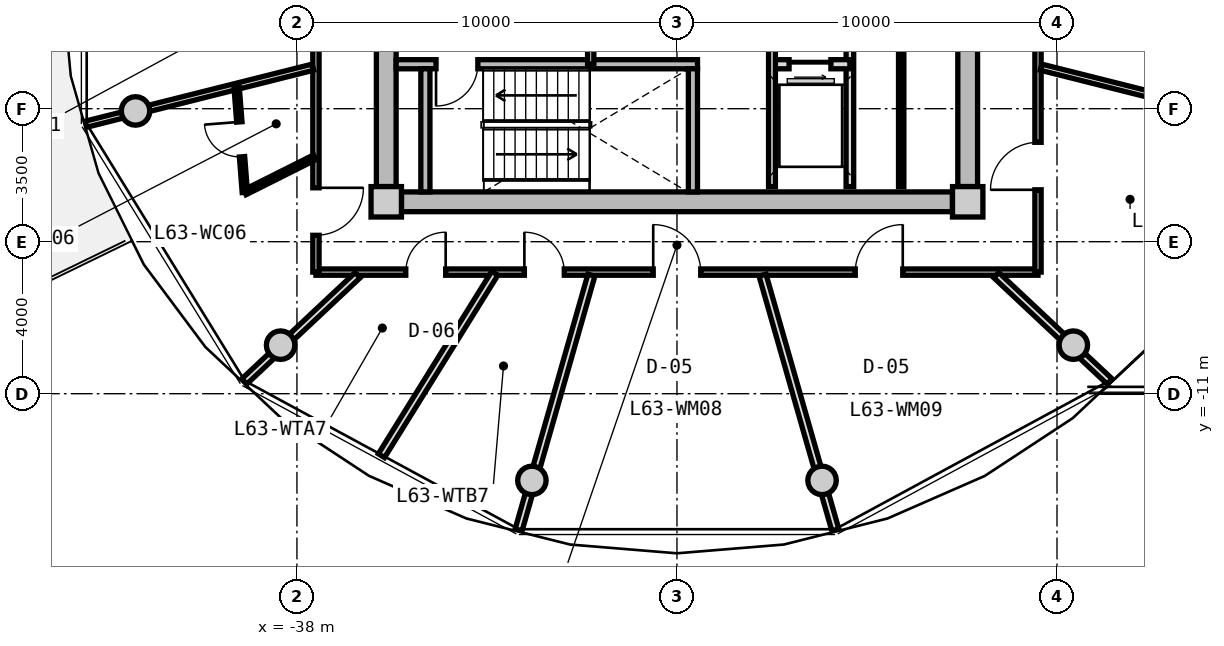
"""IFC4 building model, lengths in metres.
Left out: names, types, materials, properties, quantities, classifications, styles, units other than length and angle.
Written with IfcOpenShell. Run it as: python <this file> out.ifc"""

import sys

from ifc_helpers import new_model, si_unit, direction, frame, frame_2d, origin, origin_2d, place, context, subcontext, project, spatial, rectangle, circle, extrude, source, transform, mapped, element, fill, save


model = new_model("IFC4")
c1 = context("Model", 3, precision=1e-05, world=origin(), true_north=direction((0.0, 1.0)))
c2 = subcontext(c1, "Body", "Model", "MODEL_VIEW")
j1 = project(units=[si_unit("LENGTHUNIT", "METRE"), si_unit("PLANEANGLEUNIT", "RADIAN")], contexts=[c1])
p1 = place(None, origin())
s1 = spatial("IfcSite", under=j1, at=p1, CompositionType="ELEMENT")
p2 = place(p1, origin())
s2 = spatial("IfcBuilding", under=s1, at=p2, CompositionType="ELEMENT")
p3 = place(p2, frame((0.0, 0.0, 203.8)))
s3 = spatial("IfcBuildingStorey", under=s2, at=p3, CompositionType="ELEMENT", Elevation=203.8)
m1 = source(origin(), c2, "Body", "SweptSolid", [
    extrude(rectangle(XDim=0.8, YDim=0.8, at=origin_2d()), origin(), (0.0, 0.0, 1.0), 4.0),
])
for number, where, z_axis, x_axis in (
    (1, (-35.65, -5.95, 0.0), (0.0, 0.0, 1.0), (1.0, 0.0, 0.0)),
    (2, (-20.35, -5.95, 0.0), (0.0, 0.0, 1.0), (1.0, 0.0, 0.0)),
):
    element("IfcColumn", number, at=place(p3, frame(where, z_axis=z_axis, x_axis=x_axis)), inside=s3, PredefinedType="COLUMN", context=c2, shape_type="MappedRepresentation", body=[
        mapped(m1, transform((0.0, 0.0, 0.0), x_axis=(1.0, 0.0, 0.0), y_axis=(0.0, 1.0, 0.0), z_axis=(0.0, 0.0, 1.0), scale=1.0)),
    ])
m2 = source(origin(), c2, "Body", "SweptSolid", [
    extrude(rectangle(XDim=14.5, YDim=0.52, at=frame_2d((7.25, 0.0))), origin(), (0.0, 0.0, 1.0), 3.71),
])
p4 = place(p3, frame((-20.75, -5.95, 0.0), z_axis=(0.0, 0.0, 1.0), x_axis=(-1.0, 0.0, 0.0)))
e3 = element("IfcWall", 3, at=p4, inside=s3, PredefinedType="SHEAR", context=c2, shape_type="MappedRepresentation", body=[
    mapped(m2, transform((0.0, 0.0, 0.0), x_axis=(1.0, 0.0, 0.0), y_axis=(0.0, 1.0, 0.0), z_axis=(0.0, 0.0, 1.0), scale=1.0)),
])
m3 = source(origin(), c2, "Body", "SweptSolid", [
    extrude(rectangle(XDim=11.1, YDim=0.52, at=frame_2d((5.55, 0.0))), origin(), (0.0, 0.0, 1.0), 3.71),
])
p5 = place(p3, frame((-35.65, -5.55, 0.0), z_axis=(0.0, 0.0, 1.0), x_axis=(0.0, 1.0, 0.0)))
e4 = element("IfcWall", 4, at=p5, inside=s3, PredefinedType="SHEAR", context=c2, shape_type="MappedRepresentation", body=[
    mapped(m3, transform((0.0, 0.0, 0.0), x_axis=(1.0, 0.0, 0.0), y_axis=(0.0, 1.0, 0.0), z_axis=(0.0, 0.0, 1.0), scale=1.0)),
])
p6 = place(p5, frame((3.8, 0.0, 0.0)))
e5 = element("IfcOpeningElement", 5, at=p6, cuts=e4, PredefinedType="OPENING", context=c2, shape_type="SweptSolid", body=[
    extrude(rectangle(XDim=1.2, YDim=2.15, at=frame_2d((0.6, 1.075))), frame((0.0, 0.27, 0.0), z_axis=(0.0, -1.0, 0.0), x_axis=(1.0, 0.0, 0.0)), (0.0, 0.0, 1.0), 0.54),
])
p7 = place(p3, frame((-20.35, 5.55, 0.0), z_axis=(0.0, 0.0, 1.0), x_axis=(0.0, -1.0, 0.0)))
e6 = element("IfcWall", 6, at=p7, inside=s3, PredefinedType="SHEAR", context=c2, shape_type="MappedRepresentation", body=[
    mapped(m3, transform((0.0, 0.0, 0.0), x_axis=(1.0, 0.0, 0.0), y_axis=(0.0, 1.0, 0.0), z_axis=(0.0, 0.0, 1.0), scale=1.0)),
])
p8 = place(p7, frame((5.65, 0.0, 0.0)))
e7 = element("IfcOpeningElement", 7, at=p8, cuts=e6, PredefinedType="OPENING", context=c2, shape_type="SweptSolid", body=[
    extrude(rectangle(XDim=1.2, YDim=2.15, at=frame_2d((0.6, 1.075))), frame((0.0, 0.27, 0.0), z_axis=(0.0, -1.0, 0.0), x_axis=(1.0, 0.0, 0.0)), (0.0, 0.0, 1.0), 0.54),
])
m4 = source(origin(), c2, "Body", "SweptSolid", [
    extrude(circle(Radius=0.375, at=origin_2d()), origin(), (0.0, 0.0, 1.0), 4.0),
])
for number, where, z_axis, x_axis in (
    (8, (-42.247, -3.559, 0.0), (0.0, 0.0, 1.0), (1.0, 0.0, 0.0)),
    (9, (-38.43, -9.723, 0.0), (0.0, 0.0, 1.0), (1.0, 0.0, 0.0)),
    (10, (-31.818, -13.281, 0.0), (0.0, 0.0, 1.0), (1.0, 0.0, 0.0)),
    (11, (-24.182, -13.281, 0.0), (0.0, 0.0, 1.0), (1.0, 0.0, 0.0)),
    (12, (-17.57, -9.723, 0.0), (0.0, 0.0, 1.0), (1.0, 0.0, 0.0)),
):
    element("IfcColumn", number, at=place(p3, frame(where, z_axis=z_axis, x_axis=x_axis)), inside=s3, PredefinedType="COLUMN", context=c2, shape_type="MappedRepresentation", body=[
        mapped(m4, transform((0.0, 0.0, 0.0), x_axis=(1.0, 0.0, 0.0), y_axis=(0.0, 1.0, 0.0), z_axis=(0.0, 0.0, 1.0), scale=1.0)),
    ])
m5 = source(origin(), c2, "Body", "SweptSolid", [
    extrude(rectangle(XDim=7.93, YDim=0.24, at=frame_2d((3.965, 0.0))), origin(), (0.0, 0.0, 1.0), 3.71),
])
p9 = place(p3, frame((-35.39, -2.33, 0.0), z_axis=(0.0, 0.0, 1.0), x_axis=(1.0, 0.0, 0.0)))
e13 = element("IfcWall", 13, at=p9, inside=s3, PredefinedType="PARTITIONING", context=c2, shape_type="MappedRepresentation", body=[
    mapped(m5, transform((0.0, 0.0, 0.0), x_axis=(1.0, 0.0, 0.0), y_axis=(0.0, 1.0, 0.0), z_axis=(0.0, 0.0, 1.0), scale=1.0)),
])
p10 = place(p9, frame((1.05, 0.0, 0.0)))
e14 = element("IfcOpeningElement", 14, at=p10, cuts=e13, PredefinedType="OPENING", context=c2, shape_type="SweptSolid", body=[
    extrude(rectangle(XDim=1.1, YDim=2.15, at=frame_2d((0.55, 1.075))), frame((0.0, 0.13, 0.0), z_axis=(0.0, -1.0, 0.0), x_axis=(1.0, 0.0, 0.0)), (0.0, 0.0, 1.0), 0.26),
])
m6 = source(origin(), c2, "Body", "SweptSolid", [
    extrude(rectangle(XDim=3.24, YDim=0.24, at=frame_2d((1.62, 0.0))), origin(), (0.0, 0.0, 1.0), 3.71),
])
for number, where, z_axis, x_axis in (
    (15, (-34.62, -5.69, 0.0), (0.0, 0.0, 1.0), (0.0, 1.0, 0.0)),
    (16, (-27.58, -5.69, 0.0), (0.0, 0.0, 1.0), (0.0, 1.0, 0.0)),
):
    element("IfcWall", number, at=place(p3, frame(where, z_axis=z_axis, x_axis=x_axis)), inside=s3, PredefinedType="PARTITIONING", context=c2, shape_type="MappedRepresentation", body=[
        mapped(m6, transform((0.0, 0.0, 0.0), x_axis=(1.0, 0.0, 0.0), y_axis=(0.0, 1.0, 0.0), z_axis=(0.0, 0.0, 1.0), scale=1.0)),
    ])
m7 = source(origin(), c2, "Body", "SweptSolid", [
    extrude(rectangle(XDim=3.8, YDim=0.2, at=frame_2d((1.9, 0.0))), origin(), (0.0, 0.0, 1.0), 3.695),
])
p11 = place(p3, frame((-23.45, -5.55, 0.0), z_axis=(0.0, 0.0, 1.0), x_axis=(0.0, 1.0, 0.0)))
e17 = element("IfcWall", 17, at=p11, inside=s3, PredefinedType="PARTITIONING", context=c2, shape_type="MappedRepresentation", body=[
    mapped(m7, transform((0.0, 0.0, 0.0), x_axis=(1.0, 0.0, 0.0), y_axis=(0.0, 1.0, 0.0), z_axis=(0.0, 0.0, 1.0), scale=1.0)),
])
m8 = source(origin(), c2, "Body", "SweptSolid", [
    extrude(rectangle(XDim=2.05, YDim=0.24, at=frame_2d((1.025, 0.0))), origin(), (0.0, 0.0, 1.0), 3.695),
])
p12 = place(p3, frame((-25.5, -2.33, 0.0), z_axis=(0.0, 0.0, 1.0), x_axis=(1.0, 0.0, 0.0)))
e18 = element("IfcWall", 18, at=p12, inside=s3, PredefinedType="PARTITIONING", context=c2, shape_type="MappedRepresentation", body=[
    mapped(m8, transform((0.0, 0.0, 0.0), x_axis=(1.0, 0.0, 0.0), y_axis=(0.0, 1.0, 0.0), z_axis=(0.0, 0.0, 1.0), scale=1.0)),
])
p13 = place(p12, frame((0.45, 0.0, 0.0)))
e19 = element("IfcOpeningElement", 19, at=p13, cuts=e18, PredefinedType="OPENING", context=c2, shape_type="SweptSolid", body=[
    extrude(rectangle(XDim=1.1, YDim=2.2, at=frame_2d((0.55, 1.1))), frame((0.0, 0.13, 0.0), z_axis=(0.0, -1.0, 0.0), x_axis=(1.0, 0.0, 0.0)), (0.0, 0.0, 1.0), 0.26),
])
m9 = source(origin(), c2, "Body", "SweptSolid", [
    extrude(rectangle(XDim=4.2, YDim=0.18, at=frame_2d((2.1, 0.0))), origin(), (0.0, 0.0, 1.0), 3.695),
])
p14 = place(p3, frame((-25.5, -5.55, 0.0), z_axis=(0.0, 0.0, 1.0), x_axis=(0.0, 1.0, 0.0)))
e20 = element("IfcWall", 20, at=p14, inside=s3, PredefinedType="PARTITIONING", context=c2, shape_type="MappedRepresentation", body=[
    mapped(m9, transform((0.0, 0.0, 0.0), x_axis=(1.0, 0.0, 0.0), y_axis=(0.0, 1.0, 0.0), z_axis=(0.0, 0.0, 1.0), scale=1.0)),
])
m10 = source(origin(), c2, "Body", "SweptSolid", [
    extrude(rectangle(XDim=0.98, YDim=0.165, at=frame_2d((0.49, 0.0))), origin(), (0.0, 0.0, 1.0), 3.695),
])
p15 = place(p3, frame((-30.27, -2.33, 0.0), z_axis=(0.0, 0.0, 1.0), x_axis=(0.0, 1.0, 0.0)))
e21 = element("IfcWall", 21, at=p15, inside=s3, PredefinedType="PARTITIONING", context=c2, shape_type="MappedRepresentation", body=[
    mapped(m10, transform((0.0, 0.0, 0.0), x_axis=(1.0, 0.0, 0.0), y_axis=(0.0, 1.0, 0.0), z_axis=(0.0, 0.0, 1.0), scale=1.0)),
])
m11 = source(origin(), c2, "Body", "SweptSolid", [
    extrude(rectangle(XDim=3.8, YDim=0.14, at=frame_2d((1.9, 0.0))), origin(), (0.0, 0.0, 1.0), 3.695),
])
p16 = place(p3, frame((-22.1, -5.55, 0.0), z_axis=(0.0, 0.0, 1.0), x_axis=(0.0, 1.0, 0.0)))
e22 = element("IfcWall", 22, at=p16, inside=s3, PredefinedType="PARTITIONING", context=c2, shape_type="MappedRepresentation", body=[
    mapped(m11, transform((0.0, 0.0, 0.0), x_axis=(1.0, 0.0, 0.0), y_axis=(0.0, 1.0, 0.0), z_axis=(0.0, 0.0, 1.0), scale=1.0)),
])
m12 = source(origin(), c2, "Body", "SweptSolid", [
    extrude(rectangle(XDim=19.0, YDim=0.165, at=frame_2d((9.5, 0.0))), origin(), (0.0, 0.0, 1.0), 3.695),
])
p17 = place(p3, frame((-18.5, -7.8, 0.0), z_axis=(0.0, 0.0, 1.0), x_axis=(-1.0, 0.0, 0.0)))
e23 = element("IfcWall", 23, at=p17, inside=s3, PredefinedType="PARTITIONING", context=c2, shape_type="MappedRepresentation", body=[
    mapped(m12, transform((0.0, 0.0, 0.0), x_axis=(1.0, 0.0, 0.0), y_axis=(0.0, 1.0, 0.0), z_axis=(0.0, 0.0, 1.0), scale=1.0)),
])
p18 = place(p17, frame((15.586, 0.0, 0.0)))
e24 = element("IfcOpeningElement", 24, at=p18, cuts=e23, PredefinedType="OPENING", context=c2, shape_type="SweptSolid", body=[
    extrude(rectangle(XDim=1.05, YDim=2.15, at=frame_2d((0.525, 1.075))), frame((0.0, 0.093, 0.0), z_axis=(0.0, -1.0, 0.0), x_axis=(1.0, 0.0, 0.0)), (0.0, 0.0, 1.0), 0.185),
])
p19 = place(p17, frame((12.465, 0.0, 0.0)))
e25 = element("IfcOpeningElement", 25, at=p19, cuts=e23, PredefinedType="OPENING", context=c2, shape_type="SweptSolid", body=[
    extrude(rectangle(XDim=1.05, YDim=2.15, at=frame_2d((0.525, 1.075))), frame((0.0, 0.093, 0.0), z_axis=(0.0, -1.0, 0.0), x_axis=(1.0, 0.0, 0.0)), (0.0, 0.0, 1.0), 0.185),
])
p20 = place(p17, frame((8.875, 0.0, 0.0)))
e26 = element("IfcOpeningElement", 26, at=p20, cuts=e23, PredefinedType="OPENING", context=c2, shape_type="SweptSolid", body=[
    extrude(rectangle(XDim=1.25, YDim=2.2, at=frame_2d((0.625, 1.1))), frame((0.0, 0.093, 0.0), z_axis=(0.0, -1.0, 0.0), x_axis=(1.0, 0.0, 0.0)), (0.0, 0.0, 1.0), 0.185),
])
p21 = place(p17, frame((3.559, 0.0, 0.0)))
e27 = element("IfcOpeningElement", 27, at=p21, cuts=e23, PredefinedType="OPENING", context=c2, shape_type="SweptSolid", body=[
    extrude(rectangle(XDim=1.25, YDim=2.2, at=frame_2d((0.625, 1.1))), frame((0.0, 0.093, 0.0), z_axis=(0.0, -1.0, 0.0), x_axis=(1.0, 0.0, 0.0)), (0.0, 0.0, 1.0), 0.185),
])
m13 = source(origin(), c2, "Body", "SweptSolid", [
    extrude(rectangle(XDim=6.88, YDim=0.165, at=frame_2d((3.44, 0.0))), origin(), (0.0, 0.0, 1.0), 3.695),
])
p22 = place(p3, frame((-37.5, -7.8, 0.0), z_axis=(0.0, 0.0, 1.0), x_axis=(0.0, 1.0, 0.0)))
e28 = element("IfcWall", 28, at=p22, inside=s3, PredefinedType="PARTITIONING", context=c2, shape_type="MappedRepresentation", body=[
    mapped(m13, transform((0.0, 0.0, 0.0), x_axis=(1.0, 0.0, 0.0), y_axis=(0.0, 1.0, 0.0), z_axis=(0.0, 0.0, 1.0), scale=1.0)),
])
p23 = place(p22, frame((0.968, 0.0, 0.0)))
e29 = element("IfcOpeningElement", 29, at=p23, cuts=e28, PredefinedType="OPENING", context=c2, shape_type="SweptSolid", body=[
    extrude(rectangle(XDim=1.25, YDim=2.2, at=frame_2d((0.625, 1.1))), frame((0.0, 0.093, 0.0), z_axis=(0.0, -1.0, 0.0), x_axis=(1.0, 0.0, 0.0)), (0.0, 0.0, 1.0), 0.185),
])
p24 = place(p3, frame((-18.5, -0.92, 0.0), z_axis=(0.0, 0.0, 1.0), x_axis=(0.0, -1.0, 0.0)))
e30 = element("IfcWall", 30, at=p24, inside=s3, PredefinedType="PARTITIONING", context=c2, shape_type="MappedRepresentation", body=[
    mapped(m13, transform((0.0, 0.0, 0.0), x_axis=(1.0, 0.0, 0.0), y_axis=(0.0, 1.0, 0.0), z_axis=(0.0, 0.0, 1.0), scale=1.0)),
])
p25 = place(p24, frame((3.464, 0.0, 0.0)))
e31 = element("IfcOpeningElement", 31, at=p25, cuts=e30, PredefinedType="OPENING", context=c2, shape_type="SweptSolid", body=[
    extrude(rectangle(XDim=1.25, YDim=2.2, at=frame_2d((0.625, 1.1))), frame((0.0, 0.093, 0.0), z_axis=(0.0, -1.0, 0.0), x_axis=(1.0, 0.0, 0.0)), (0.0, 0.0, 1.0), 0.185),
])
m14 = source(origin(), c2, "Body", "SweptSolid", [
    extrude(rectangle(XDim=6.157, YDim=0.165, at=frame_2d((3.079, 0.0))), origin(), (0.0, 0.0, 1.0), 3.295),
])
for number, where, z_axis, x_axis in (
    (32, (-37.58, -2.407, 0.0), (0.0, 0.0, 1.0), (-0.97, -0.244, 0.0)),
    (33, (-18.42, -2.407, 0.0), (0.0, 0.0, 1.0), (0.97, -0.244, 0.0)),
):
    element("IfcWall", number, at=place(p3, frame(where, z_axis=z_axis, x_axis=x_axis)), inside=s3, PredefinedType="PARTITIONING", context=c2, shape_type="MappedRepresentation", body=[
        mapped(m14, transform((0.0, 0.0, 0.0), x_axis=(1.0, 0.0, 0.0), y_axis=(0.0, 1.0, 0.0), z_axis=(0.0, 0.0, 1.0), scale=1.0)),
    ])
m15 = source(origin(), c2, "Body", "SweptSolid", [
    extrude(rectangle(XDim=4.089, YDim=0.19, at=frame_2d((2.044, 0.0))), origin(), (0.0, 0.0, 1.0), 3.295),
])
p26 = place(p3, frame((-36.402, -7.88, 0.0), z_axis=(0.0, 0.0, 1.0), x_axis=(-0.729401273609, -0.684086092577, 0.0)))
e34 = element("IfcWall", 34, at=p26, inside=s3, PredefinedType="PARTITIONING", context=c2, shape_type="MappedRepresentation", body=[
    mapped(m15, transform((0.0, 0.0, 0.0), x_axis=(1.0, 0.0, 0.0), y_axis=(0.0, 1.0, 0.0), z_axis=(0.0, 0.0, 1.0), scale=1.0)),
])
m16 = source(origin(), c2, "Body", "SweptSolid", [
    extrude(rectangle(XDim=2.06, YDim=0.14, at=frame_2d((1.03, 0.0))), origin(), (0.0, 0.0, 1.0), 3.695),
])
p27 = place(p3, frame((-37.53, -4.778, 0.0), z_axis=(0.0, 0.0, 1.0), x_axis=(-0.893952568722, -0.448161583444, 0.0)))
e35 = element("IfcWall", 35, at=p27, inside=s3, PredefinedType="PARTITIONING", context=c2, shape_type="MappedRepresentation", body=[
    mapped(m16, transform((0.0, 0.0, 0.0), x_axis=(1.0, 0.0, 0.0), y_axis=(0.0, 1.0, 0.0), z_axis=(0.0, 0.0, 1.0), scale=1.0)),
])
m17 = source(origin(), c2, "Body", "SweptSolid", [
    extrude(rectangle(XDim=2.798, YDim=0.14, at=frame_2d((1.399, 0.0))), origin(), (0.0, 0.0, 1.0), 3.695),
])
p28 = place(p3, frame((-39.371, -5.701, 0.0), z_axis=(0.0, 0.0, 1.0), x_axis=(-0.077823984089, 0.996967114553, 0.0)))
e36 = element("IfcWall", 36, at=p28, inside=s3, PredefinedType="PARTITIONING", context=c2, shape_type="MappedRepresentation", body=[
    mapped(m17, transform((0.0, 0.0, 0.0), x_axis=(1.0, 0.0, 0.0), y_axis=(0.0, 1.0, 0.0), z_axis=(0.0, 0.0, 1.0), scale=1.0)),
])
p29 = place(p28, frame((0.939, 0.0, 0.0)))
e37 = element("IfcOpeningElement", 37, at=p29, cuts=e36, PredefinedType="OPENING", context=c2, shape_type="SweptSolid", body=[
    extrude(rectangle(XDim=0.92, YDim=2.1, at=frame_2d((0.46, 1.05))), frame((0.0, 0.08, 0.0), z_axis=(0.0, -1.0, 0.0), x_axis=(1.0, 0.0, 0.0)), (0.0, 0.0, 1.0), 0.16),
])
m18 = source(origin(), c2, "Body", "SweptSolid", [
    extrude(rectangle(XDim=6.974, YDim=0.19, at=frame_2d((3.487, 0.0))), origin(), (0.0, 0.0, 1.0), 3.295),
])
p30 = place(p3, frame((-30.251, -7.88, 0.0), z_axis=(0.0, 0.0, 1.0), x_axis=(-0.274707256801, -0.961527910703, 0.0)))
e38 = element("IfcWall", 38, at=p30, inside=s3, PredefinedType="PARTITIONING", context=c2, shape_type="MappedRepresentation", body=[
    mapped(m18, transform((0.0, 0.0, 0.0), x_axis=(1.0, 0.0, 0.0), y_axis=(0.0, 1.0, 0.0), z_axis=(0.0, 0.0, 1.0), scale=1.0)),
])
m19 = source(origin(), c2, "Body", "SweptSolid", [
    extrude(rectangle(XDim=5.652, YDim=0.19, at=frame_2d((2.826, 0.0))), origin(), (0.0, 0.0, 1.0), 3.695),
])
p31 = place(p3, frame((-32.794, -7.83, 0.0), z_axis=(0.0, 0.0, 1.0), x_axis=(-0.527566076956, -0.84951399897, 0.0)))
e39 = element("IfcWall", 39, at=p31, inside=s3, PredefinedType="PARTITIONING", context=c2, shape_type="MappedRepresentation", body=[
    mapped(m19, transform((0.0, 0.0, 0.0), x_axis=(1.0, 0.0, 0.0), y_axis=(0.0, 1.0, 0.0), z_axis=(0.0, 0.0, 1.0), scale=1.0)),
])
p32 = place(p3, frame((-25.749, -7.88, 0.0), z_axis=(0.0, 0.0, 1.0), x_axis=(0.274707256801, -0.961527910703, 0.0)))
e40 = element("IfcWall", 40, at=p32, inside=s3, PredefinedType="PARTITIONING", context=c2, shape_type="MappedRepresentation", body=[
    mapped(m18, transform((0.0, 0.0, 0.0), x_axis=(1.0, 0.0, 0.0), y_axis=(0.0, 1.0, 0.0), z_axis=(0.0, 0.0, 1.0), scale=1.0)),
])
p33 = place(p3, frame((-19.598, -7.88, 0.0), z_axis=(0.0, 0.0, 1.0), x_axis=(0.729401273609, -0.684086092577, 0.0)))
e41 = element("IfcWall", 41, at=p33, inside=s3, PredefinedType="PARTITIONING", context=c2, shape_type="MappedRepresentation", body=[
    mapped(m15, transform((0.0, 0.0, 0.0), x_axis=(1.0, 0.0, 0.0), y_axis=(0.0, 1.0, 0.0), z_axis=(0.0, 0.0, 1.0), scale=1.0)),
])
m20 = source(origin(), c2, "Body", "SweptSolid", [
    extrude(rectangle(XDim=1.1, YDim=2.15, at=frame_2d((0.55, 1.075))), frame((0.0, 0.025, 0.0), z_axis=(0.0, -1.0, 0.0), x_axis=(1.0, 0.0, 0.0)), (0.0, 0.0, 1.0), 0.05),
])
p34 = place(p10, frame((1.1, 0.0, 0.0), z_axis=(0.0, 0.0, 1.0), x_axis=(-1.0, 0.0, 0.0)))
e42 = element("IfcDoor", 42, at=p34, inside=s3, OperationType="SINGLE_SWING_RIGHT", PredefinedType="DOOR", context=c2, shape_type="MappedRepresentation", body=[
    mapped(m20, transform((0.0, 0.0, 0.0), x_axis=(1.0, 0.0, 0.0), y_axis=(0.0, 1.0, 0.0), z_axis=(0.0, 0.0, 1.0), scale=1.0)),
])
fill(e14, e42)
m21 = source(origin(), c2, "Body", "SweptSolid", [
    extrude(rectangle(XDim=1.1, YDim=2.2, at=frame_2d((0.55, 1.1))), frame((0.0, 0.025, 0.0), z_axis=(0.0, -1.0, 0.0), x_axis=(1.0, 0.0, 0.0)), (0.0, 0.0, 1.0), 0.05),
])
p35 = place(p13, frame((1.1, 0.0, 0.0), z_axis=(0.0, 0.0, 1.0), x_axis=(-1.0, 0.0, 0.0)))
e43 = element("IfcDoor", 43, at=p35, inside=s3, OperationType="SLIDING_TO_RIGHT", PredefinedType="DOOR", context=c2, shape_type="MappedRepresentation", body=[
    mapped(m21, transform((0.0, 0.0, 0.0), x_axis=(1.0, 0.0, 0.0), y_axis=(0.0, 1.0, 0.0), z_axis=(0.0, 0.0, 1.0), scale=1.0)),
])
fill(e19, e43)
m22 = source(origin(), c2, "Body", "SweptSolid", [
    extrude(rectangle(XDim=1.25, YDim=2.2, at=frame_2d((0.625, 1.1))), frame((0.0, 0.025, 0.0), z_axis=(0.0, -1.0, 0.0), x_axis=(1.0, 0.0, 0.0)), (0.0, 0.0, 1.0), 0.05),
])
p36 = place(p23, frame((1.25, 0.0, 0.0), z_axis=(0.0, 0.0, 1.0), x_axis=(-1.0, 0.0, 0.0)))
e44 = element("IfcDoor", 44, at=p36, inside=s3, OperationType="SINGLE_SWING_LEFT", PredefinedType="DOOR", context=c2, shape_type="MappedRepresentation", body=[
    mapped(m22, transform((0.0, 0.0, 0.0), x_axis=(1.0, 0.0, 0.0), y_axis=(0.0, 1.0, 0.0), z_axis=(0.0, 0.0, 1.0), scale=1.0)),
])
fill(e29, e44)
m23 = source(origin(), c2, "Body", "SweptSolid", [
    extrude(rectangle(XDim=0.92, YDim=2.1, at=frame_2d((0.46, 1.05))), frame((0.0, 0.025, 0.0), z_axis=(0.0, -1.0, 0.0), x_axis=(1.0, 0.0, 0.0)), (0.0, 0.0, 1.0), 0.05),
])
p37 = place(p29, origin())
e45 = element("IfcDoor", 45, at=p37, inside=s3, OperationType="SINGLE_SWING_RIGHT", PredefinedType="DOOR", context=c2, shape_type="MappedRepresentation", body=[
    mapped(m23, transform((0.0, 0.0, 0.0), x_axis=(1.0, 0.0, 0.0), y_axis=(0.0, 1.0, 0.0), z_axis=(0.0, 0.0, 1.0), scale=1.0)),
])
fill(e37, e45)
m24 = source(origin(), c2, "Body", "SweptSolid", [
    extrude(rectangle(XDim=1.05, YDim=2.15, at=frame_2d((0.525, 1.075))), frame((0.0, 0.025, 0.0), z_axis=(0.0, -1.0, 0.0), x_axis=(1.0, 0.0, 0.0)), (0.0, 0.0, 1.0), 0.05),
])
p38 = place(p18, frame((1.05, 0.0, 0.0), z_axis=(0.0, 0.0, 1.0), x_axis=(-1.0, 0.0, 0.0)))
e46 = element("IfcDoor", 46, at=p38, inside=s3, OperationType="SINGLE_SWING_RIGHT", PredefinedType="DOOR", context=c2, shape_type="MappedRepresentation", body=[
    mapped(m24, transform((0.0, 0.0, 0.0), x_axis=(1.0, 0.0, 0.0), y_axis=(0.0, 1.0, 0.0), z_axis=(0.0, 0.0, 1.0), scale=1.0)),
])
fill(e24, e46)
p39 = place(p19, frame((1.05, 0.0, 0.0), z_axis=(0.0, 0.0, 1.0), x_axis=(-1.0, 0.0, 0.0)))
e47 = element("IfcDoor", 47, at=p39, inside=s3, OperationType="SINGLE_SWING_LEFT", PredefinedType="DOOR", context=c2, shape_type="MappedRepresentation", body=[
    mapped(m24, transform((0.0, 0.0, 0.0), x_axis=(1.0, 0.0, 0.0), y_axis=(0.0, 1.0, 0.0), z_axis=(0.0, 0.0, 1.0), scale=1.0)),
])
fill(e25, e47)
p40 = place(p20, frame((1.25, 0.0, 0.0), z_axis=(0.0, 0.0, 1.0), x_axis=(-1.0, 0.0, 0.0)))
e48 = element("IfcDoor", 48, at=p40, inside=s3, OperationType="SINGLE_SWING_LEFT", PredefinedType="DOOR", context=c2, shape_type="MappedRepresentation", body=[
    mapped(m22, transform((0.0, 0.0, 0.0), x_axis=(1.0, 0.0, 0.0), y_axis=(0.0, 1.0, 0.0), z_axis=(0.0, 0.0, 1.0), scale=1.0)),
])
fill(e26, e48)
p41 = place(p21, frame((1.25, 0.0, 0.0), z_axis=(0.0, 0.0, 1.0), x_axis=(-1.0, 0.0, 0.0)))
e49 = element("IfcDoor", 49, at=p41, inside=s3, OperationType="SINGLE_SWING_RIGHT", PredefinedType="DOOR", context=c2, shape_type="MappedRepresentation", body=[
    mapped(m22, transform((0.0, 0.0, 0.0), x_axis=(1.0, 0.0, 0.0), y_axis=(0.0, 1.0, 0.0), z_axis=(0.0, 0.0, 1.0), scale=1.0)),
])
fill(e27, e49)
p42 = place(p25, frame((1.25, 0.0, 0.0), z_axis=(0.0, 0.0, 1.0), x_axis=(-1.0, 0.0, 0.0)))
e50 = element("IfcDoor", 50, at=p42, inside=s3, OperationType="SINGLE_SWING_LEFT", PredefinedType="DOOR", context=c2, shape_type="MappedRepresentation", body=[
    mapped(m22, transform((0.0, 0.0, 0.0), x_axis=(1.0, 0.0, 0.0), y_axis=(0.0, 1.0, 0.0), z_axis=(0.0, 0.0, 1.0), scale=1.0)),
])
fill(e31, e50)
save(model, sys.argv[1])
